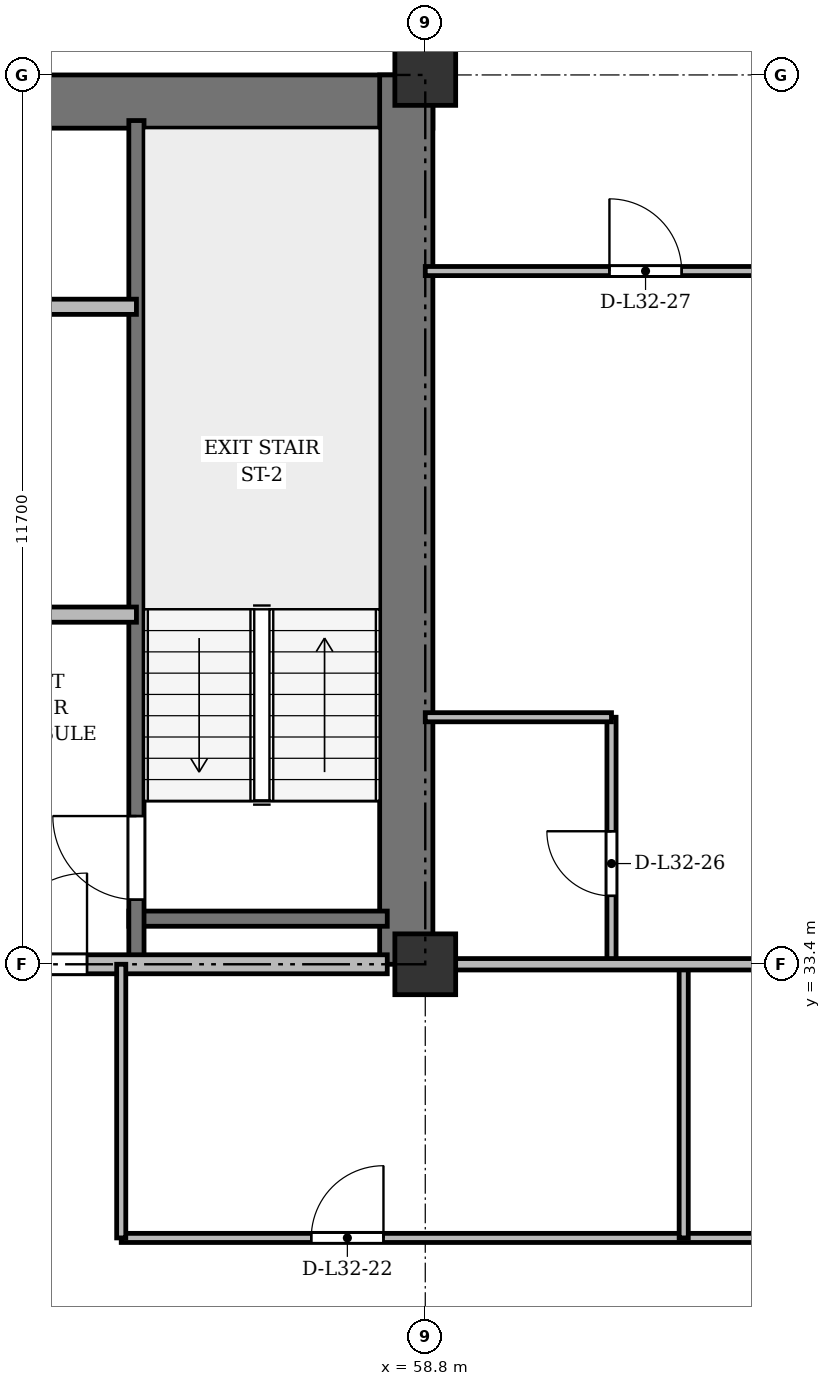
"""IFC4 building model, lengths in metres.
Left out: names, types, materials, properties, quantities, classifications, styles, units other than length and angle.
Written with IfcOpenShell. Run it as: python <this file> out.ifc"""

import sys

from ifc_helpers import new_model, si_unit, direction, frame, frame_2d, origin, origin_2d, place, context, subcontext, project, spatial, rectangle, extrude, source, transform, mapped, element, fill, save


model = new_model("IFC4")
c1 = context("Model", 3, precision=1e-05, world=origin(), true_north=direction((0.0, 1.0)))
c2 = subcontext(c1, "Body", "Model", "MODEL_VIEW")
j1 = project(units=[si_unit("LENGTHUNIT", "METRE"), si_unit("PLANEANGLEUNIT", "RADIAN")], contexts=[c1])
p1 = place(None, origin())
s1 = spatial("IfcSite", under=j1, at=p1, CompositionType="ELEMENT")
p2 = place(p1, origin())
s2 = spatial("IfcBuilding", under=s1, at=p2, CompositionType="ELEMENT")
p3 = place(p2, frame((0.0, 0.0, 124.9)))
s3 = spatial("IfcBuildingStorey", under=s2, at=p3, CompositionType="ELEMENT", Elevation=124.9)
m1 = source(origin(), c2, "Body", "SweptSolid", [
    extrude(rectangle(XDim=0.8, YDim=0.8, at=origin_2d()), origin(), (0.0, 0.0, 1.0), 3.6),
])
for number, where, z_axis, x_axis in (
    (1, (58.8, 33.4, 0.0), (0.0, 0.0, 1.0), (1.0, 0.0, 0.0)),
    (2, (58.8, 45.1, 0.0), (0.0, 0.0, 1.0), (1.0, 0.0, 0.0)),
):
    element("IfcColumn", number, at=place(p3, frame(where, z_axis=z_axis, x_axis=x_axis)), inside=s3, PredefinedType="COLUMN", context=c2, shape_type="MappedRepresentation", body=[
        mapped(m1, transform((0.0, 0.0, 0.0), x_axis=(1.0, 0.0, 0.0), y_axis=(0.0, 1.0, 0.0), z_axis=(0.0, 0.0, 1.0), scale=1.0)),
    ])
p4 = place(p3, frame((15.5, 44.75, 0.0), z_axis=(0.0, 0.0, 1.0), x_axis=(1.0, 0.0, 0.0)))
e3 = element("IfcWall", 3, at=p4, inside=s3, PredefinedType="SHEAR", context=c2, shape_type="SweptSolid", body=[
    extrude(rectangle(XDim=43.4, YDim=0.7, at=frame_2d((21.7, 0.0))), origin(), (0.0, 0.0, 1.0), 3.34),
])
p5 = place(p3, frame((58.55, 33.4, 0.0), z_axis=(0.0, 0.0, 1.0), x_axis=(0.0, 1.0, 0.0)))
e4 = element("IfcWall", 4, at=p5, inside=s3, PredefinedType="SHEAR", context=c2, shape_type="SweptSolid", body=[
    extrude(rectangle(XDim=11.7, YDim=0.7, at=frame_2d((5.85, 0.0))), origin(), (0.0, 0.0, 1.0), 3.34),
])
p6 = place(p3, frame((54.9, 34.0, 0.0), z_axis=(0.0, 0.0, 1.0), x_axis=(1.0, 0.0, 0.0)))
e5 = element("IfcWall", 5, at=p6, inside=s3, PredefinedType="SHEAR", context=c2, shape_type="SweptSolid", body=[
    extrude(rectangle(XDim=3.4, YDim=0.2, at=frame_2d((1.7, 0.0))), origin(), (0.0, 0.0, 1.0), 3.34),
])
p7 = place(p3, frame((55.0, 33.4, 0.0), z_axis=(0.0, 0.0, 1.0), x_axis=(0.0, 1.0, 0.0)))
e6 = element("IfcWall", 6, at=p7, inside=s3, PredefinedType="SHEAR", context=c2, shape_type="SweptSolid", body=[
    extrude(rectangle(XDim=11.1, YDim=0.2, at=frame_2d((5.55, 0.0))), origin(), (0.0, 0.0, 1.0), 3.34),
])
p8 = place(p7, frame((0.85, 0.0, 0.0)))
e7 = element("IfcOpeningElement", 7, at=p8, cuts=e6, PredefinedType="OPENING", context=c2, shape_type="SweptSolid", body=[
    extrude(rectangle(XDim=1.1, YDim=2.15, at=frame_2d((0.55, 1.075))), frame((0.0, 0.11, 0.0), z_axis=(0.0, -1.0, 0.0), x_axis=(1.0, 0.0, 0.0)), (0.0, 0.0, 1.0), 0.22),
])
p9 = place(p3, frame((47.15, 42.05, 0.0), z_axis=(0.0, 0.0, 1.0), x_axis=(1.0, 0.0, 0.0)))
e8 = element("IfcWall", 8, at=p9, inside=s3, PredefinedType="SOLIDWALL", context=c2, shape_type="SweptSolid", body=[
    extrude(rectangle(XDim=7.85, YDim=0.2, at=frame_2d((3.925, 0.0))), origin(), (0.0, 0.0, 1.0), 2.84),
])
p10 = place(p9, frame((0.75, 0.0, 0.0)))
e9 = element("IfcOpeningElement", 9, at=p10, cuts=e8, PredefinedType="OPENING", context=c2, shape_type="SweptSolid", body=[
    extrude(rectangle(XDim=0.9, YDim=2.1, at=frame_2d((0.45, 1.05))), frame((0.0, 0.11, 0.0), z_axis=(0.0, -1.0, 0.0), x_axis=(1.0, 0.0, 0.0)), (0.0, 0.0, 1.0), 0.22),
])
p11 = place(p9, frame((3.85, 0.0, 0.0)))
e10 = element("IfcOpeningElement", 10, at=p11, cuts=e8, PredefinedType="OPENING", context=c2, shape_type="SweptSolid", body=[
    extrude(rectangle(XDim=0.9, YDim=2.1, at=frame_2d((0.45, 1.05))), frame((0.0, 0.11, 0.0), z_axis=(0.0, -1.0, 0.0), x_axis=(1.0, 0.0, 0.0)), (0.0, 0.0, 1.0), 0.22),
])
p12 = place(p3, frame((52.45, 38.0, 0.0), z_axis=(0.0, 0.0, 1.0), x_axis=(1.0, 0.0, 0.0)))
e11 = element("IfcWall", 11, at=p12, inside=s3, PredefinedType="PARTITIONING", context=c2, shape_type="SweptSolid", body=[
    extrude(rectangle(XDim=2.55, YDim=0.2, at=frame_2d((1.275, 0.0))), origin(), (0.0, 0.0, 1.0), 3.34),
])
p13 = place(p3, frame((47.15, 33.4, 0.0), z_axis=(0.0, 0.0, 1.0), x_axis=(1.0, 0.0, 0.0)))
e12 = element("IfcWall", 12, at=p13, inside=s3, PredefinedType="PARTITIONING", context=c2, shape_type="SweptSolid", body=[
    extrude(rectangle(XDim=11.15, YDim=0.25, at=frame_2d((5.575, 0.0))), origin(), (0.0, 0.0, 1.0), 2.752),
])
p14 = place(p13, frame((0.7, 0.0, 0.0)))
e13 = element("IfcOpeningElement", 13, at=p14, cuts=e12, PredefinedType="OPENING", context=c2, shape_type="SweptSolid", body=[
    extrude(rectangle(XDim=0.95, YDim=2.15, at=frame_2d((0.475, 1.075))), frame((0.0, 0.135, 0.0), z_axis=(0.0, -1.0, 0.0), x_axis=(1.0, 0.0, 0.0)), (0.0, 0.0, 1.0), 0.27),
])
p15 = place(p13, frame((6.0, 0.0, 0.0)))
e14 = element("IfcOpeningElement", 14, at=p15, cuts=e12, PredefinedType="OPENING", context=c2, shape_type="SweptSolid", body=[
    extrude(rectangle(XDim=1.2, YDim=2.15, at=frame_2d((0.6, 1.075))), frame((0.0, 0.135, 0.0), z_axis=(0.0, -1.0, 0.0), x_axis=(1.0, 0.0, 0.0)), (0.0, 0.0, 1.0), 0.27),
])
p16 = place(p3, frame((54.8, 29.8, 0.0), z_axis=(0.0, 0.0, 1.0), x_axis=(1.0, 0.0, 0.0)))
e15 = element("IfcWall", 15, at=p16, inside=s3, PredefinedType="PARTITIONING", context=c2, shape_type="SweptSolid", body=[
    extrude(rectangle(XDim=14.85, YDim=0.12, at=frame_2d((7.425, 0.0))), origin(), (0.0, 0.0, 1.0), 2.84),
])
p17 = place(p16, frame((2.5, 0.0, 0.0)))
e16 = element("IfcOpeningElement", 16, at=p17, cuts=e15, PredefinedType="OPENING", context=c2, shape_type="SweptSolid", body=[
    extrude(rectangle(XDim=0.95, YDim=2.15, at=frame_2d((0.475, 1.075))), frame((0.0, 0.07, 0.0), z_axis=(0.0, -1.0, 0.0), x_axis=(1.0, 0.0, 0.0)), (0.0, 0.0, 1.0), 0.14),
])
p18 = place(p16, frame((9.2, 0.0, 0.0)))
e17 = element("IfcOpeningElement", 17, at=p18, cuts=e15, PredefinedType="OPENING", context=c2, shape_type="SweptSolid", body=[
    extrude(rectangle(XDim=0.95, YDim=2.15, at=frame_2d((0.475, 1.075))), frame((0.0, 0.07, 0.0), z_axis=(0.0, -1.0, 0.0), x_axis=(1.0, 0.0, 0.0)), (0.0, 0.0, 1.0), 0.14),
])
for number, where, z_axis, x_axis in (
    (18, (62.2, 29.8, 0.0), (0.0, 0.0, 1.0), (0.0, 1.0, 0.0)),
    (19, (54.8, 29.8, 0.0), (0.0, 0.0, 1.0), (0.0, 1.0, 0.0)),
):
    element("IfcWall", number, at=place(p3, frame(where, z_axis=z_axis, x_axis=x_axis)), inside=s3, PredefinedType="PARTITIONING", context=c2, shape_type="SweptSolid", body=[
        extrude(rectangle(XDim=3.6, YDim=0.12, at=frame_2d((1.8, 0.0))), origin(), (0.0, 0.0, 1.0), 2.752),
    ])
p19 = place(p3, frame((61.25, 33.4, 0.0), z_axis=(0.0, 0.0, 1.0), x_axis=(0.0, 1.0, 0.0)))
e20 = element("IfcWall", 20, at=p19, inside=s3, PredefinedType="PARTITIONING", context=c2, shape_type="SweptSolid", body=[
    extrude(rectangle(XDim=3.25, YDim=0.12, at=frame_2d((1.625, 0.0))), origin(), (0.0, 0.0, 1.0), 2.752),
])
p20 = place(p19, frame((0.9, 0.0, 0.0)))
e21 = element("IfcOpeningElement", 21, at=p20, cuts=e20, PredefinedType="OPENING", context=c2, shape_type="SweptSolid", body=[
    extrude(rectangle(XDim=0.85, YDim=2.1, at=frame_2d((0.425, 1.05))), frame((0.0, 0.07, 0.0), z_axis=(0.0, -1.0, 0.0), x_axis=(1.0, 0.0, 0.0)), (0.0, 0.0, 1.0), 0.14),
])
p21 = place(p3, frame((58.8, 36.65, 0.0), z_axis=(0.0, 0.0, 1.0), x_axis=(1.0, 0.0, 0.0)))
e22 = element("IfcWall", 22, at=p21, inside=s3, PredefinedType="PARTITIONING", context=c2, shape_type="SweptSolid", body=[
    extrude(rectangle(XDim=2.45, YDim=0.12, at=frame_2d((1.225, 0.0))), origin(), (0.0, 0.0, 1.0), 2.84),
])
p22 = place(p3, frame((58.8, 42.52, 0.0), z_axis=(0.0, 0.0, 1.0), x_axis=(1.0, 0.0, 0.0)))
e23 = element("IfcWall", 23, at=p22, inside=s3, PredefinedType="PARTITIONING", context=c2, shape_type="SweptSolid", body=[
    extrude(rectangle(XDim=5.425, YDim=0.12, at=frame_2d((2.712, 0.0))), origin(), (0.0, 0.0, 1.0), 2.84),
])
p23 = place(p22, frame((2.423, 0.0, 0.0)))
e24 = element("IfcOpeningElement", 24, at=p23, cuts=e23, PredefinedType="OPENING", context=c2, shape_type="SweptSolid", body=[
    extrude(rectangle(XDim=0.95, YDim=2.15, at=frame_2d((0.475, 1.075))), frame((0.0, 0.07, 0.0), z_axis=(0.0, -1.0, 0.0), x_axis=(1.0, 0.0, 0.0)), (0.0, 0.0, 1.0), 0.14),
])
p24 = place(p3, frame((58.8, 33.4, 0.0), z_axis=(0.0, 0.0, 1.0), x_axis=(1.0, 0.0, 0.0)))
e25 = element("IfcWall", 25, at=p24, inside=s3, PredefinedType="PARTITIONING", context=c2, shape_type="SweptSolid", body=[
    extrude(rectangle(XDim=10.85, YDim=0.15, at=frame_2d((5.425, 0.0))), origin(), (0.0, 0.0, 1.0), 2.752),
])
p25 = place(p24, frame((4.933, 0.0, 0.0)))
e26 = element("IfcOpeningElement", 26, at=p25, cuts=e25, PredefinedType="OPENING", context=c2, shape_type="SweptSolid", body=[
    extrude(rectangle(XDim=0.95, YDim=2.15, at=frame_2d((0.475, 1.075))), frame((0.0, 0.085, 0.0), z_axis=(0.0, -1.0, 0.0), x_axis=(1.0, 0.0, 0.0)), (0.0, 0.0, 1.0), 0.17),
])
p26 = place(p3, frame((58.8, 44.75, 0.0), z_axis=(0.0, 0.0, 1.0), x_axis=(0.0, 1.0, 0.0)))
e27 = element("IfcWall", 27, at=p26, inside=s3, PredefinedType="PARTITIONING", context=c2, shape_type="SweptSolid", body=[
    extrude(rectangle(XDim=3.61, YDim=0.15, at=frame_2d((1.805, 0.0))), origin(), (0.0, 0.0, 1.0), 2.84),
])
p27 = place(p26, frame((1.1, 0.0, 0.0)))
e28 = element("IfcOpeningElement", 28, at=p27, cuts=e27, PredefinedType="OPENING", context=c2, shape_type="SweptSolid", body=[
    extrude(rectangle(XDim=0.95, YDim=2.15, at=frame_2d((0.475, 1.075))), frame((0.0, 0.085, 0.0), z_axis=(0.0, -1.0, 0.0), x_axis=(1.0, 0.0, 0.0)), (0.0, 0.0, 1.0), 0.17),
])
m2 = source(origin(), c2, "Body", "SweptSolid", [
    extrude(rectangle(XDim=1.1, YDim=2.15, at=frame_2d((0.55, 1.075))), frame((0.0, 0.025, 0.0), z_axis=(0.0, -1.0, 0.0), x_axis=(1.0, 0.0, 0.0)), (0.0, 0.0, 1.0), 0.05),
])
p28 = place(p8, origin())
e29 = element("IfcDoor", 29, at=p28, inside=s3, OperationType="SINGLE_SWING_RIGHT", PredefinedType="DOOR", context=c2, shape_type="MappedRepresentation", body=[
    mapped(m2, transform((0.0, 0.0, 0.0), x_axis=(1.0, 0.0, 0.0), y_axis=(0.0, 1.0, 0.0), z_axis=(0.0, 0.0, 1.0), scale=1.0)),
])
fill(e7, e29)
m3 = source(origin(), c2, "Body", "SweptSolid", [
    extrude(rectangle(XDim=1.2, YDim=2.15, at=frame_2d((0.6, 1.075))), frame((0.0, 0.025, 0.0), z_axis=(0.0, -1.0, 0.0), x_axis=(1.0, 0.0, 0.0)), (0.0, 0.0, 1.0), 0.05),
])
p29 = place(p15, origin())
e30 = element("IfcDoor", 30, at=p29, inside=s3, OperationType="SINGLE_SWING_RIGHT", PredefinedType="DOOR", context=c2, shape_type="MappedRepresentation", body=[
    mapped(m3, transform((0.0, 0.0, 0.0), x_axis=(1.0, 0.0, 0.0), y_axis=(0.0, 1.0, 0.0), z_axis=(0.0, 0.0, 1.0), scale=1.0)),
])
fill(e14, e30)
m4 = source(origin(), c2, "Body", "SweptSolid", [
    extrude(rectangle(XDim=0.95, YDim=2.15, at=frame_2d((0.475, 1.075))), frame((0.0, 0.025, 0.0), z_axis=(0.0, -1.0, 0.0), x_axis=(1.0, 0.0, 0.0)), (0.0, 0.0, 1.0), 0.05),
])
p30 = place(p17, origin())
e31 = element("IfcDoor", 31, at=p30, inside=s3, OperationType="SINGLE_SWING_RIGHT", PredefinedType="DOOR", context=c2, shape_type="MappedRepresentation", body=[
    mapped(m4, transform((0.0, 0.0, 0.0), x_axis=(1.0, 0.0, 0.0), y_axis=(0.0, 1.0, 0.0), z_axis=(0.0, 0.0, 1.0), scale=1.0)),
])
fill(e16, e31)
m5 = source(origin(), c2, "Body", "SweptSolid", [
    extrude(rectangle(XDim=0.85, YDim=2.1, at=frame_2d((0.425, 1.05))), frame((0.0, 0.025, 0.0), z_axis=(0.0, -1.0, 0.0), x_axis=(1.0, 0.0, 0.0)), (0.0, 0.0, 1.0), 0.05),
])
p31 = place(p20, origin())
e32 = element("IfcDoor", 32, at=p31, inside=s3, OperationType="SINGLE_SWING_RIGHT", PredefinedType="DOOR", context=c2, shape_type="MappedRepresentation", body=[
    mapped(m5, transform((0.0, 0.0, 0.0), x_axis=(1.0, 0.0, 0.0), y_axis=(0.0, 1.0, 0.0), z_axis=(0.0, 0.0, 1.0), scale=1.0)),
])
fill(e21, e32)
p32 = place(p23, origin())
e33 = element("IfcDoor", 33, at=p32, inside=s3, OperationType="SINGLE_SWING_LEFT", PredefinedType="DOOR", context=c2, shape_type="MappedRepresentation", body=[
    mapped(m4, transform((0.0, 0.0, 0.0), x_axis=(1.0, 0.0, 0.0), y_axis=(0.0, 1.0, 0.0), z_axis=(0.0, 0.0, 1.0), scale=1.0)),
])
fill(e24, e33)
save(model, sys.argv[1])
